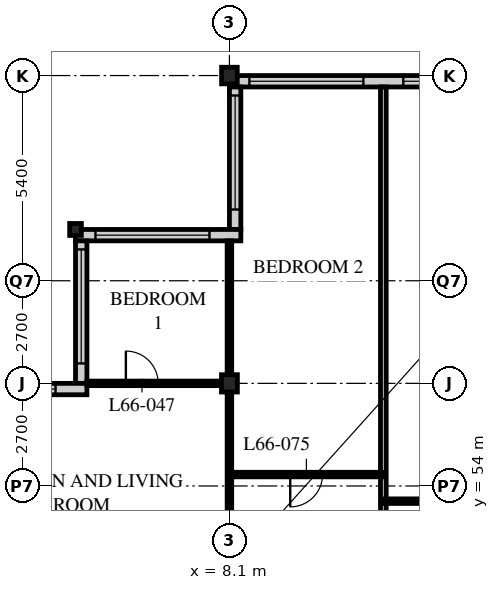
"""IFC4 building model, lengths in metres.
Left out: names, types, materials, properties, quantities, classifications, styles, units other than length and angle.
Written with IfcOpenShell. Run it as: python <this file> out.ifc"""

import sys

from ifc_helpers import new_model, si_unit, direction, frame, frame_2d, origin, origin_2d, place, context, subcontext, project, spatial, rectangle, i_section, extrude, element, fill, save


model = new_model("IFC4")
c1 = context("Model", 3, precision=1e-05, world=origin(), true_north=direction((0.0, 1.0)))
c2 = subcontext(c1, "Body", "Model", "MODEL_VIEW")
j1 = project(units=[si_unit("LENGTHUNIT", "METRE"), si_unit("PLANEANGLEUNIT", "RADIAN")], contexts=[c1])
p1 = place(None, origin())
s1 = spatial("IfcSite", under=j1, at=p1, CompositionType="ELEMENT")
p2 = place(p1, origin())
s2 = spatial("IfcBuilding", under=s1, at=p2, CompositionType="ELEMENT")
p3 = place(p2, frame((0.0, 0.0, 258.0)))
s3 = spatial("IfcBuildingStorey", under=s2, at=p3, CompositionType="ELEMENT", Elevation=258.0)
p4 = place(p3, frame((4.05, 60.75, 0.0), z_axis=(0.0, 0.0, 1.0), x_axis=(1.0, 0.0, 0.0)))
e1 = element("IfcColumn", 1, at=p4, inside=s3, PredefinedType="COLUMN", context=c2, shape_type="SweptSolid", body=[
    extrude(i_section(OverallWidth=0.307, OverallDepth=0.314, WebThickness=0.012, FlangeThickness=0.019, FilletRadius=0.015, at=origin_2d()), origin(), (0.0, 0.0, 1.0), 3.9),
])
p5 = place(p3, frame((8.1, 56.7, 0.0), z_axis=(0.0, 0.0, 1.0), x_axis=(1.0, 0.0, 0.0)))
e2 = element("IfcColumn", 2, at=p5, inside=s3, PredefinedType="COLUMN", context=c2, shape_type="SweptSolid", body=[
    extrude(i_section(OverallWidth=0.418, OverallDepth=0.456, WebThickness=0.042, FlangeThickness=0.067, FilletRadius=0.015, at=origin_2d()), origin(), (0.0, 0.0, 1.0), 3.9),
])
p6 = place(p3, frame((8.1, 64.8, 0.0), z_axis=(0.0, 0.0, 1.0), x_axis=(1.0, 0.0, 0.0)))
e3 = element("IfcColumn", 3, at=p6, inside=s3, PredefinedType="COLUMN", context=c2, shape_type="SweptSolid", body=[
    extrude(i_section(OverallWidth=0.412, OverallDepth=0.437, WebThickness=0.036, FlangeThickness=0.058, FilletRadius=0.015, at=origin_2d()), origin(), (0.0, 0.0, 1.0), 3.9),
])
p7 = place(p3, frame((48.3, 64.65, 0.0), z_axis=(0.0, 0.0, 1.0), x_axis=(-1.0, 0.0, 0.0)))
e4 = element("IfcWall", 4, at=p7, inside=s3, PredefinedType="SOLIDWALL", context=c2, shape_type="SweptSolid", body=[
    extrude(rectangle(XDim=40.2, YDim=0.3, at=frame_2d((20.1, 0.0))), origin(), (0.0, 0.0, 1.0), 3.69),
])
p8 = place(p7, frame((0.225, 0.0, 0.6)))
e5 = element("IfcOpeningElement", 5, at=p8, cuts=e4, PredefinedType="OPENING", context=c2, shape_type="SweptSolid", body=[
    extrude(rectangle(XDim=3.0, YDim=2.4, at=frame_2d((1.5, 1.2))), frame((0.0, 0.16, 0.0), z_axis=(0.0, -1.0, 0.0), x_axis=(1.0, 0.0, 0.0)), (0.0, 0.0, 1.0), 0.32),
])
p9 = place(p7, frame((4.275, 0.0, 0.6)))
e6 = element("IfcOpeningElement", 6, at=p9, cuts=e4, PredefinedType="OPENING", context=c2, shape_type="SweptSolid", body=[
    extrude(rectangle(XDim=3.0, YDim=2.4, at=frame_2d((1.5, 1.2))), frame((0.0, 0.16, 0.0), z_axis=(0.0, -1.0, 0.0), x_axis=(1.0, 0.0, 0.0)), (0.0, 0.0, 1.0), 0.32),
])
p10 = place(p7, frame((8.325, 0.0, 0.6)))
e7 = element("IfcOpeningElement", 7, at=p10, cuts=e4, PredefinedType="OPENING", context=c2, shape_type="SweptSolid", body=[
    extrude(rectangle(XDim=3.0, YDim=2.4, at=frame_2d((1.5, 1.2))), frame((0.0, 0.16, 0.0), z_axis=(0.0, -1.0, 0.0), x_axis=(1.0, 0.0, 0.0)), (0.0, 0.0, 1.0), 0.32),
])
p11 = place(p7, frame((12.375, 0.0, 0.6)))
e8 = element("IfcOpeningElement", 8, at=p11, cuts=e4, PredefinedType="OPENING", context=c2, shape_type="SweptSolid", body=[
    extrude(rectangle(XDim=3.0, YDim=2.4, at=frame_2d((1.5, 1.2))), frame((0.0, 0.16, 0.0), z_axis=(0.0, -1.0, 0.0), x_axis=(1.0, 0.0, 0.0)), (0.0, 0.0, 1.0), 0.32),
])
p12 = place(p7, frame((16.425, 0.0, 0.6)))
e9 = element("IfcOpeningElement", 9, at=p12, cuts=e4, PredefinedType="OPENING", context=c2, shape_type="SweptSolid", body=[
    extrude(rectangle(XDim=3.0, YDim=2.4, at=frame_2d((1.5, 1.2))), frame((0.0, 0.16, 0.0), z_axis=(0.0, -1.0, 0.0), x_axis=(1.0, 0.0, 0.0)), (0.0, 0.0, 1.0), 0.32),
])
p13 = place(p7, frame((20.475, 0.0, 0.6)))
e10 = element("IfcOpeningElement", 10, at=p13, cuts=e4, PredefinedType="OPENING", context=c2, shape_type="SweptSolid", body=[
    extrude(rectangle(XDim=3.0, YDim=2.4, at=frame_2d((1.5, 1.2))), frame((0.0, 0.16, 0.0), z_axis=(0.0, -1.0, 0.0), x_axis=(1.0, 0.0, 0.0)), (0.0, 0.0, 1.0), 0.32),
])
p14 = place(p7, frame((24.525, 0.0, 0.6)))
e11 = element("IfcOpeningElement", 11, at=p14, cuts=e4, PredefinedType="OPENING", context=c2, shape_type="SweptSolid", body=[
    extrude(rectangle(XDim=3.0, YDim=2.4, at=frame_2d((1.5, 1.2))), frame((0.0, 0.16, 0.0), z_axis=(0.0, -1.0, 0.0), x_axis=(1.0, 0.0, 0.0)), (0.0, 0.0, 1.0), 0.32),
])
p15 = place(p7, frame((28.575, 0.0, 0.6)))
e12 = element("IfcOpeningElement", 12, at=p15, cuts=e4, PredefinedType="OPENING", context=c2, shape_type="SweptSolid", body=[
    extrude(rectangle(XDim=3.0, YDim=2.4, at=frame_2d((1.5, 1.2))), frame((0.0, 0.16, 0.0), z_axis=(0.0, -1.0, 0.0), x_axis=(1.0, 0.0, 0.0)), (0.0, 0.0, 1.0), 0.32),
])
p16 = place(p7, frame((32.625, 0.0, 0.6)))
e13 = element("IfcOpeningElement", 13, at=p16, cuts=e4, PredefinedType="OPENING", context=c2, shape_type="SweptSolid", body=[
    extrude(rectangle(XDim=3.0, YDim=2.4, at=frame_2d((1.5, 1.2))), frame((0.0, 0.16, 0.0), z_axis=(0.0, -1.0, 0.0), x_axis=(1.0, 0.0, 0.0)), (0.0, 0.0, 1.0), 0.32),
])
p17 = place(p7, frame((36.675, 0.0, 0.6)))
e14 = element("IfcOpeningElement", 14, at=p17, cuts=e4, PredefinedType="OPENING", context=c2, shape_type="SweptSolid", body=[
    extrude(rectangle(XDim=3.0, YDim=2.4, at=frame_2d((1.5, 1.2))), frame((0.0, 0.16, 0.0), z_axis=(0.0, -1.0, 0.0), x_axis=(1.0, 0.0, 0.0)), (0.0, 0.0, 1.0), 0.32),
])
p18 = place(p3, frame((8.25, 64.5, 0.0), z_axis=(0.0, 0.0, 1.0), x_axis=(0.0, -1.0, 0.0)))
e15 = element("IfcWall", 15, at=p18, inside=s3, PredefinedType="SOLIDWALL", context=c2, shape_type="SweptSolid", body=[
    extrude(rectangle(XDim=3.75, YDim=0.3, at=frame_2d((1.875, 0.0))), origin(), (0.0, 0.0, 1.0), 3.69),
])
p19 = place(p18, frame((0.225, 0.0, 0.6)))
e16 = element("IfcOpeningElement", 16, at=p19, cuts=e15, PredefinedType="OPENING", context=c2, shape_type="SweptSolid", body=[
    extrude(rectangle(XDim=3.0, YDim=2.3, at=frame_2d((1.5, 1.15))), frame((0.0, 0.16, 0.0), z_axis=(0.0, -1.0, 0.0), x_axis=(1.0, 0.0, 0.0)), (0.0, 0.0, 1.0), 0.32),
])
p20 = place(p3, frame((8.4, 60.6, 0.0), z_axis=(0.0, 0.0, 1.0), x_axis=(-1.0, 0.0, 0.0)))
e17 = element("IfcWall", 17, at=p20, inside=s3, PredefinedType="SOLIDWALL", context=c2, shape_type="SweptSolid", body=[
    extrude(rectangle(XDim=4.35, YDim=0.3, at=frame_2d((2.175, 0.0))), origin(), (0.0, 0.0, 1.0), 3.69),
])
p21 = place(p20, frame((0.825, 0.0, 0.6)))
e18 = element("IfcOpeningElement", 18, at=p21, cuts=e17, PredefinedType="OPENING", context=c2, shape_type="SweptSolid", body=[
    extrude(rectangle(XDim=3.0, YDim=2.3, at=frame_2d((1.5, 1.15))), frame((0.0, 0.16, 0.0), z_axis=(0.0, -1.0, 0.0), x_axis=(1.0, 0.0, 0.0)), (0.0, 0.0, 1.0), 0.32),
])
p22 = place(p3, frame((4.2, 60.45, 0.0), z_axis=(0.0, 0.0, 1.0), x_axis=(0.0, -1.0, 0.0)))
e19 = element("IfcWall", 19, at=p22, inside=s3, PredefinedType="SOLIDWALL", context=c2, shape_type="SweptSolid", body=[
    extrude(rectangle(XDim=3.75, YDim=0.3, at=frame_2d((1.875, 0.0))), origin(), (0.0, 0.0, 1.0), 3.69),
])
p23 = place(p22, frame((0.225, 0.0, 0.6)))
e20 = element("IfcOpeningElement", 20, at=p23, cuts=e19, PredefinedType="OPENING", context=c2, shape_type="SweptSolid", body=[
    extrude(rectangle(XDim=3.0, YDim=2.3, at=frame_2d((1.5, 1.15))), frame((0.0, 0.16, 0.0), z_axis=(0.0, -1.0, 0.0), x_axis=(1.0, 0.0, 0.0)), (0.0, 0.0, 1.0), 0.32),
])
p24 = place(p3, frame((4.35, 56.55, 0.0), z_axis=(0.0, 0.0, 1.0), x_axis=(-1.0, 0.0, 0.0)))
e21 = element("IfcWall", 21, at=p24, inside=s3, PredefinedType="SOLIDWALL", context=c2, shape_type="SweptSolid", body=[
    extrude(rectangle(XDim=4.35, YDim=0.3, at=frame_2d((2.175, 0.0))), origin(), (0.0, 0.0, 1.0), 3.69),
])
p25 = place(p24, frame((0.825, 0.0, 0.6)))
e22 = element("IfcOpeningElement", 22, at=p25, cuts=e21, PredefinedType="OPENING", context=c2, shape_type="SweptSolid", body=[
    extrude(rectangle(XDim=3.0, YDim=2.3, at=frame_2d((1.5, 1.15))), frame((0.0, 0.16, 0.0), z_axis=(0.0, -1.0, 0.0), x_axis=(1.0, 0.0, 0.0)), (0.0, 0.0, 1.0), 0.32),
])
p26 = place(p3, frame((8.1, 51.0, 0.0), z_axis=(0.0, 0.0, 1.0), x_axis=(0.0, 1.0, 0.0)))
e23 = element("IfcWall", 23, at=p26, inside=s3, PredefinedType="PARTITIONING", context=c2, shape_type="SweptSolid", body=[
    extrude(rectangle(XDim=9.45, YDim=0.12, at=frame_2d((4.725, 0.0))), origin(), (0.0, 0.0, 1.0), 3.078),
])
p27 = place(p3, frame((8.1, 56.7, 0.0), z_axis=(0.0, 0.0, 1.0), x_axis=(-1.0, 0.0, 0.0)))
e24 = element("IfcWall", 24, at=p27, inside=s3, PredefinedType="PARTITIONING", context=c2, shape_type="SweptSolid", body=[
    extrude(rectangle(XDim=3.75, YDim=0.12, at=frame_2d((1.875, 0.0))), origin(), (0.0, 0.0, 1.0), 3.078),
])
p28 = place(p27, frame((1.875, 0.0, 0.0)))
e25 = element("IfcOpeningElement", 25, at=p28, cuts=e24, PredefinedType="OPENING", context=c2, shape_type="SweptSolid", body=[
    extrude(rectangle(XDim=0.85, YDim=2.1, at=frame_2d((0.425, 1.05))), frame((0.0, 0.07, 0.0), z_axis=(0.0, -1.0, 0.0), x_axis=(1.0, 0.0, 0.0)), (0.0, 0.0, 1.0), 0.14),
])
p29 = place(p3, frame((12.15, 48.6, 0.0), z_axis=(0.0, 0.0, 1.0), x_axis=(0.0, 1.0, 0.0)))
e26 = element("IfcWall", 26, at=p29, inside=s3, PredefinedType="PARTITIONING", context=c2, shape_type="SweptSolid", body=[
    extrude(rectangle(XDim=15.9, YDim=0.15, at=frame_2d((7.95, 0.0))), origin(), (0.0, 0.0, 1.0), 3.69),
])
p30 = place(p3, frame((12.15, 53.6, 0.0), z_axis=(0.0, 0.0, 1.0), x_axis=(1.0, 0.0, 0.0)))
e27 = element("IfcWall", 27, at=p30, inside=s3, PredefinedType="PARTITIONING", context=c2, shape_type="SweptSolid", body=[
    extrude(rectangle(XDim=8.1, YDim=0.12, at=frame_2d((4.05, 0.0))), origin(), (0.0, 0.0, 1.0), 3.69),
])
p31 = place(p30, frame((1.675, 0.0, 0.0)))
e28 = element("IfcOpeningElement", 28, at=p31, cuts=e27, PredefinedType="OPENING", context=c2, shape_type="SweptSolid", body=[
    extrude(rectangle(XDim=0.85, YDim=2.1, at=frame_2d((0.425, 1.05))), frame((0.0, 0.07, 0.0), z_axis=(0.0, -1.0, 0.0), x_axis=(1.0, 0.0, 0.0)), (0.0, 0.0, 1.0), 0.14),
])
p32 = place(p3, frame((8.1, 54.3, 0.0), z_axis=(0.0, 0.0, 1.0), x_axis=(1.0, 0.0, 0.0)))
e29 = element("IfcWall", 29, at=p32, inside=s3, PredefinedType="PARTITIONING", context=c2, shape_type="SweptSolid", body=[
    extrude(rectangle(XDim=4.05, YDim=0.12, at=frame_2d((2.025, 0.0))), origin(), (0.0, 0.0, 1.0), 3.69),
])
p33 = place(p32, frame((1.6, 0.0, 0.0)))
e30 = element("IfcOpeningElement", 30, at=p33, cuts=e29, PredefinedType="OPENING", context=c2, shape_type="SweptSolid", body=[
    extrude(rectangle(XDim=0.85, YDim=2.1, at=frame_2d((0.425, 1.05))), frame((0.0, 0.07, 0.0), z_axis=(0.0, -1.0, 0.0), x_axis=(1.0, 0.0, 0.0)), (0.0, 0.0, 1.0), 0.14),
])
p34 = place(p16, origin())
e31 = element("IfcWindow", 31, at=p34, inside=s3, PartitioningType="SINGLE_PANEL", PredefinedType="WINDOW", context=c2, shape_type="SweptSolid", body=[
    extrude(rectangle(XDim=3.0, YDim=2.4, at=frame_2d((1.5, 1.2))), frame((0.0, 0.03, 0.0), z_axis=(0.0, -1.0, 0.0), x_axis=(1.0, 0.0, 0.0)), (0.0, 0.0, 1.0), 0.06),
])
fill(e13, e31)
p35 = place(p17, origin())
e32 = element("IfcWindow", 32, at=p35, inside=s3, PartitioningType="SINGLE_PANEL", PredefinedType="WINDOW", context=c2, shape_type="SweptSolid", body=[
    extrude(rectangle(XDim=3.0, YDim=2.4, at=frame_2d((1.5, 1.2))), frame((0.0, 0.03, 0.0), z_axis=(0.0, -1.0, 0.0), x_axis=(1.0, 0.0, 0.0)), (0.0, 0.0, 1.0), 0.06),
])
fill(e14, e32)
p36 = place(p19, origin())
e33 = element("IfcWindow", 33, at=p36, inside=s3, PartitioningType="SINGLE_PANEL", PredefinedType="WINDOW", context=c2, shape_type="SweptSolid", body=[
    extrude(rectangle(XDim=3.0, YDim=2.3, at=frame_2d((1.5, 1.15))), frame((0.0, 0.03, 0.0), z_axis=(0.0, -1.0, 0.0), x_axis=(1.0, 0.0, 0.0)), (0.0, 0.0, 1.0), 0.06),
])
fill(e16, e33)
p37 = place(p21, origin())
e34 = element("IfcWindow", 34, at=p37, inside=s3, PartitioningType="SINGLE_PANEL", PredefinedType="WINDOW", context=c2, shape_type="SweptSolid", body=[
    extrude(rectangle(XDim=3.0, YDim=2.3, at=frame_2d((1.5, 1.15))), frame((0.0, 0.03, 0.0), z_axis=(0.0, -1.0, 0.0), x_axis=(1.0, 0.0, 0.0)), (0.0, 0.0, 1.0), 0.06),
])
fill(e18, e34)
p38 = place(p23, origin())
e35 = element("IfcWindow", 35, at=p38, inside=s3, PartitioningType="SINGLE_PANEL", PredefinedType="WINDOW", context=c2, shape_type="SweptSolid", body=[
    extrude(rectangle(XDim=3.0, YDim=2.3, at=frame_2d((1.5, 1.15))), frame((0.0, 0.03, 0.0), z_axis=(0.0, -1.0, 0.0), x_axis=(1.0, 0.0, 0.0)), (0.0, 0.0, 1.0), 0.06),
])
fill(e20, e35)
p39 = place(p25, origin())
e36 = element("IfcWindow", 36, at=p39, inside=s3, PartitioningType="SINGLE_PANEL", PredefinedType="WINDOW", context=c2, shape_type="SweptSolid", body=[
    extrude(rectangle(XDim=3.0, YDim=2.3, at=frame_2d((1.5, 1.15))), frame((0.0, 0.03, 0.0), z_axis=(0.0, -1.0, 0.0), x_axis=(1.0, 0.0, 0.0)), (0.0, 0.0, 1.0), 0.06),
])
fill(e22, e36)
p40 = place(p28, origin())
e37 = element("IfcDoor", 37, at=p40, inside=s3, OperationType="SINGLE_SWING_LEFT", PredefinedType="DOOR", context=c2, shape_type="SweptSolid", body=[
    extrude(rectangle(XDim=0.85, YDim=2.1, at=frame_2d((0.425, 1.05))), frame((0.0, 0.025, 0.0), z_axis=(0.0, -1.0, 0.0), x_axis=(1.0, 0.0, 0.0)), (0.0, 0.0, 1.0), 0.05),
])
fill(e25, e37)
p41 = place(p33, origin())
e38 = element("IfcDoor", 38, at=p41, inside=s3, OperationType="SINGLE_SWING_RIGHT", PredefinedType="DOOR", context=c2, shape_type="SweptSolid", body=[
    extrude(rectangle(XDim=0.85, YDim=2.1, at=frame_2d((0.425, 1.05))), frame((0.0, 0.025, 0.0), z_axis=(0.0, -1.0, 0.0), x_axis=(1.0, 0.0, 0.0)), (0.0, 0.0, 1.0), 0.05),
])
fill(e30, e38)
save(model, sys.argv[1])
